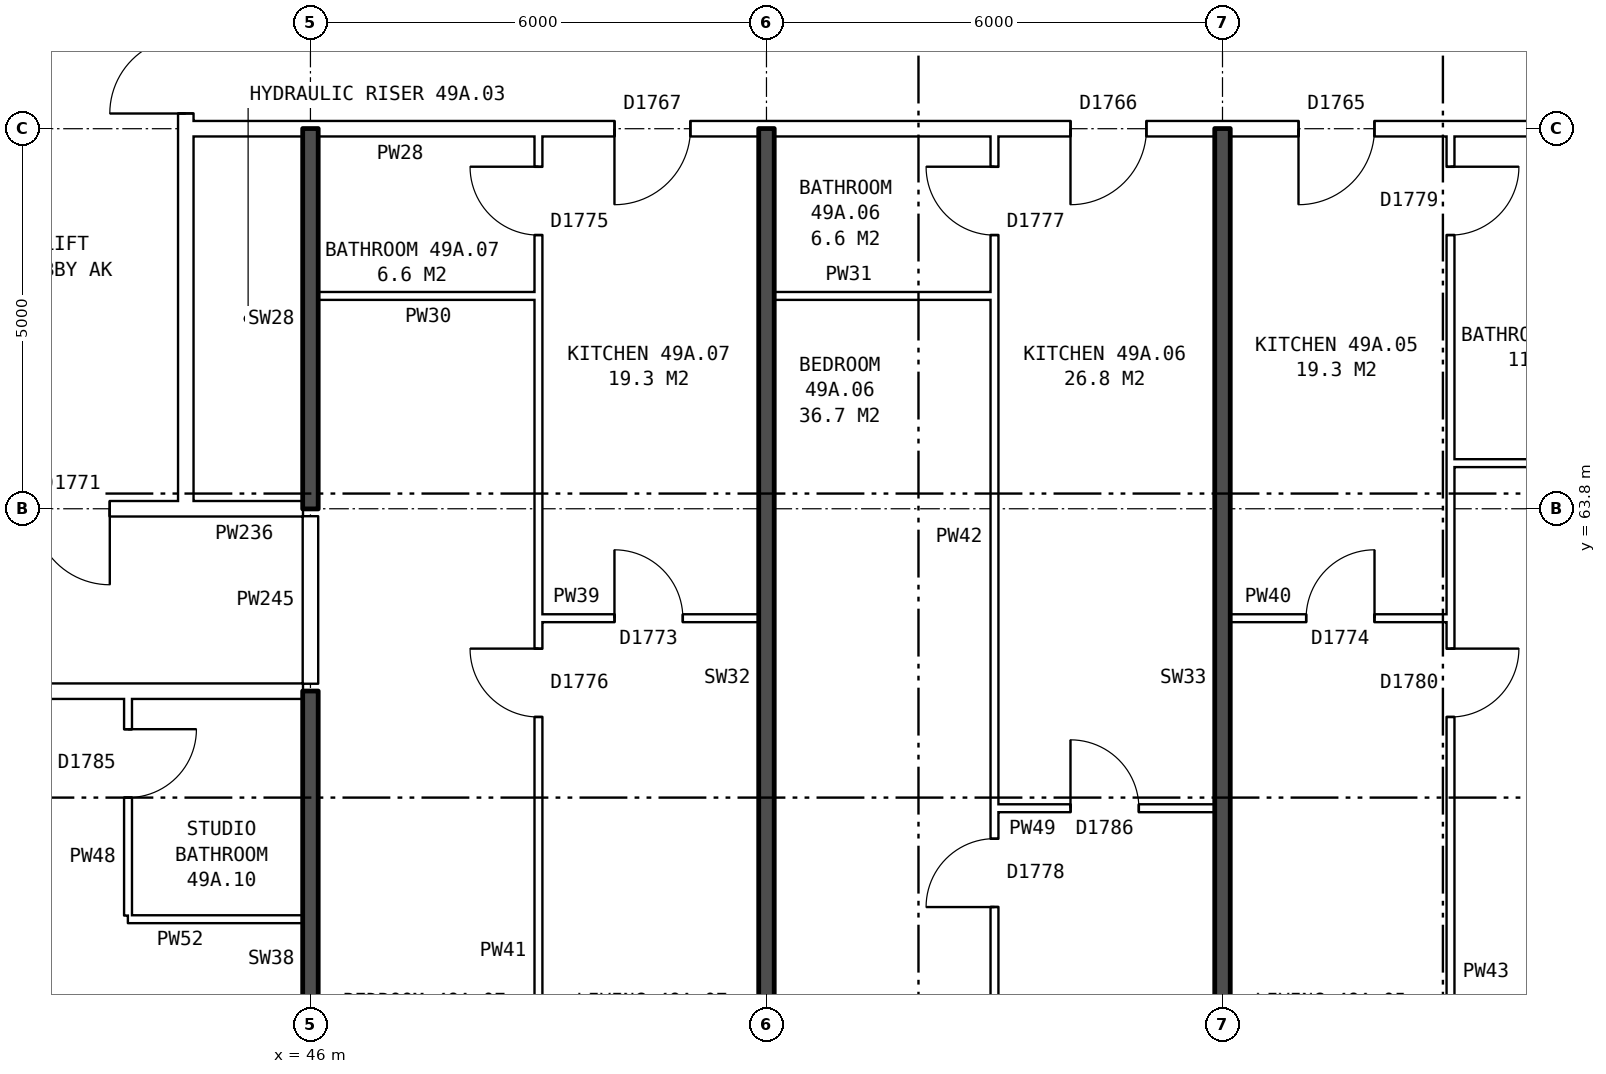
"""IFC4 building model, lengths in metres.
Left out: names, types, materials, properties, quantities, classifications, styles, units other than length and angle.
Written with IfcOpenShell. Run it as: python <this file> out.ifc"""

import sys

from ifc_helpers import new_model, si_unit, direction, frame, frame_2d, origin, place, context, subcontext, project, spatial, rectangle, extrude, element, fill, save


model = new_model("IFC4")
c1 = context("Model", 3, precision=1e-05, world=origin(), true_north=direction((0.0, 1.0)))
c2 = subcontext(c1, "Body", "Model", "MODEL_VIEW")
j1 = project(units=[si_unit("LENGTHUNIT", "METRE"), si_unit("PLANEANGLEUNIT", "RADIAN")], contexts=[c1])
p1 = place(None, origin())
s1 = spatial("IfcSite", under=j1, at=p1, CompositionType="ELEMENT")
p2 = place(p1, origin())
s2 = spatial("IfcBuilding", under=s1, at=p2, CompositionType="ELEMENT")
p3 = place(p2, frame((0.0, 0.0, 175.8)))
s3 = spatial("IfcBuildingStorey", under=s2, at=p3, CompositionType="ELEMENT", Elevation=175.8)
p4 = place(p3, frame((44.36, 63.9, 0.0), z_axis=(0.0, 0.0, 1.0), x_axis=(0.0, 1.0, 0.0)))
e1 = element("IfcWall", 1, at=p4, inside=s3, PredefinedType="PARTITIONING", context=c2, shape_type="SweptSolid", body=[
    extrude(rectangle(XDim=12.2, YDim=0.2, at=frame_2d((6.1, 0.0))), origin(), (0.0, 0.0, 1.0), 2.85),
])
p5 = place(p4, frame((5.1, 0.0, 0.0)))
e2 = element("IfcOpeningElement", 2, at=p5, cuts=e1, PredefinedType="OPENING", context=c2, shape_type="SweptSolid", body=[
    extrude(rectangle(XDim=2.0, YDim=2.1, at=frame_2d((1.0, 1.05))), frame((0.0, 0.11, 0.0), z_axis=(0.0, -1.0, 0.0), x_axis=(1.0, 0.0, 0.0)), (0.0, 0.0, 1.0), 0.22),
])
p6 = place(p3, frame((43.6, 58.4, 0.0), z_axis=(0.0, 0.0, 1.0), x_axis=(1.0, 0.0, 0.0)))
e3 = element("IfcWall", 3, at=p6, inside=s3, PredefinedType="PARTITIONING", context=c2, shape_type="SweptSolid", body=[
    extrude(rectangle(XDim=2.3, YDim=0.1, at=frame_2d((1.15, 0.0))), origin(), (0.0, 0.0, 1.0), 2.85),
])
p7 = place(p3, frame((55.0, 59.86, 0.0), z_axis=(0.0, 0.0, 1.0), x_axis=(1.0, 0.0, 0.0)))
e4 = element("IfcWall", 4, at=p7, inside=s3, PredefinedType="PARTITIONING", context=c2, shape_type="SweptSolid", body=[
    extrude(rectangle(XDim=2.9, YDim=0.1, at=frame_2d((1.45, 0.0))), origin(), (0.0, 0.0, 1.0), 2.85),
])
p8 = place(p7, frame((1.0, 0.0, 0.0)))
e5 = element("IfcOpeningElement", 5, at=p8, cuts=e4, PredefinedType="OPENING", context=c2, shape_type="SweptSolid", body=[
    extrude(rectangle(XDim=0.9, YDim=2.1, at=frame_2d((0.45, 1.05))), frame((0.0, 0.06, 0.0), z_axis=(0.0, -1.0, 0.0), x_axis=(1.0, 0.0, 0.0)), (0.0, 0.0, 1.0), 0.12),
])
p9 = place(p3, frame((30.61, 61.4, 0.0), z_axis=(0.0, 0.0, 1.0), x_axis=(1.0, 0.0, 0.0)))
e6 = element("IfcWall", 6, at=p9, inside=s3, PredefinedType="PARTITIONING", context=c2, shape_type="SweptSolid", body=[
    extrude(rectangle(XDim=15.29, YDim=0.2, at=frame_2d((7.645, 0.0))), origin(), (0.0, 0.0, 1.0), 2.85),
])
p10 = place(p9, frame((10.69, 0.0, 0.0)))
e7 = element("IfcOpeningElement", 7, at=p10, cuts=e6, PredefinedType="OPENING", context=c2, shape_type="SweptSolid", body=[
    extrude(rectangle(XDim=1.0, YDim=2.1, at=frame_2d((0.5, 1.05))), frame((0.0, 0.11, 0.0), z_axis=(0.0, -1.0, 0.0), x_axis=(1.0, 0.0, 0.0)), (0.0, 0.0, 1.0), 0.22),
])
p11 = place(p9, frame((5.89, 0.0, 0.0)))
e8 = element("IfcOpeningElement", 8, at=p11, cuts=e6, PredefinedType="OPENING", context=c2, shape_type="SweptSolid", body=[
    extrude(rectangle(XDim=1.0, YDim=2.1, at=frame_2d((0.5, 1.05))), frame((0.0, 0.11, 0.0), z_axis=(0.0, -1.0, 0.0), x_axis=(1.0, 0.0, 0.0)), (0.0, 0.0, 1.0), 0.22),
])
p12 = place(p3, frame((49.0, 62.36, 0.0), z_axis=(0.0, 0.0, 1.0), x_axis=(1.0, 0.0, 0.0)))
e9 = element("IfcWall", 9, at=p12, inside=s3, PredefinedType="PARTITIONING", context=c2, shape_type="SweptSolid", body=[
    extrude(rectangle(XDim=2.9, YDim=0.1, at=frame_2d((1.45, 0.0))), origin(), (0.0, 0.0, 1.0), 2.85),
])
p13 = place(p12, frame((1.0, 0.0, 0.0)))
e10 = element("IfcOpeningElement", 10, at=p13, cuts=e9, PredefinedType="OPENING", context=c2, shape_type="SweptSolid", body=[
    extrude(rectangle(XDim=0.9, YDim=2.1, at=frame_2d((0.45, 1.05))), frame((0.0, 0.06, 0.0), z_axis=(0.0, -1.0, 0.0), x_axis=(1.0, 0.0, 0.0)), (0.0, 0.0, 1.0), 0.12),
])
p14 = place(p3, frame((58.1, 62.36, 0.0), z_axis=(0.0, 0.0, 1.0), x_axis=(1.0, 0.0, 0.0)))
e11 = element("IfcWall", 11, at=p14, inside=s3, PredefinedType="PARTITIONING", context=c2, shape_type="SweptSolid", body=[
    extrude(rectangle(XDim=2.9, YDim=0.1, at=frame_2d((1.45, 0.0))), origin(), (0.0, 0.0, 1.0), 2.85),
])
p15 = place(p14, frame((1.0, 0.0, 0.0)))
e12 = element("IfcOpeningElement", 12, at=p15, cuts=e11, PredefinedType="OPENING", context=c2, shape_type="SweptSolid", body=[
    extrude(rectangle(XDim=0.9, YDim=2.1, at=frame_2d((0.45, 1.05))), frame((0.0, 0.06, 0.0), z_axis=(0.0, -1.0, 0.0), x_axis=(1.0, 0.0, 0.0)), (0.0, 0.0, 1.0), 0.12),
])
p16 = place(p3, frame((41.36, 63.8, 0.0), z_axis=(0.0, 0.0, 1.0), x_axis=(1.0, 0.0, 0.0)))
e13 = element("IfcWall", 13, at=p16, inside=s3, PredefinedType="PARTITIONING", context=c2, shape_type="SweptSolid", body=[
    extrude(rectangle(XDim=3.0, YDim=0.2, at=frame_2d((1.5, 0.0))), origin(), (0.0, 0.0, 1.0), 2.85),
])
p17 = place(p16, frame((1.0, 0.0, 0.0)))
e14 = element("IfcOpeningElement", 14, at=p17, cuts=e13, PredefinedType="OPENING", context=c2, shape_type="SweptSolid", body=[
    extrude(rectangle(XDim=1.0, YDim=2.1, at=frame_2d((0.5, 1.05))), frame((0.0, 0.11, 0.0), z_axis=(0.0, -1.0, 0.0), x_axis=(1.0, 0.0, 0.0)), (0.0, 0.0, 1.0), 0.22),
])
p18 = place(p3, frame((44.36, 63.8, 0.0), z_axis=(0.0, 0.0, 1.0), x_axis=(1.0, 0.0, 0.0)))
e15 = element("IfcWall", 15, at=p18, inside=s3, PredefinedType="PARTITIONING", context=c2, shape_type="SweptSolid", body=[
    extrude(rectangle(XDim=1.54, YDim=0.2, at=frame_2d((0.77, 0.0))), origin(), (0.0, 0.0, 1.0), 2.85),
])
p19 = place(p3, frame((61.0, 64.4, 0.0), z_axis=(0.0, 0.0, 1.0), x_axis=(1.0, 0.0, 0.0)))
e16 = element("IfcWall", 16, at=p19, inside=s3, PredefinedType="PARTITIONING", context=c2, shape_type="SweptSolid", body=[
    extrude(rectangle(XDim=2.64, YDim=0.1, at=frame_2d((1.32, 0.0))), origin(), (0.0, 0.0, 1.0), 2.85),
])
for number, where, z_axis, x_axis in (
    (17, (46.1, 66.6, 0.0), (0.0, 0.0, 1.0), (1.0, 0.0, 0.0)),
    (18, (52.1, 66.6, 0.0), (0.0, 0.0, 1.0), (1.0, 0.0, 0.0)),
):
    element("IfcWall", number, at=place(p3, frame(where, z_axis=z_axis, x_axis=x_axis)), inside=s3, PredefinedType="PARTITIONING", context=c2, shape_type="SweptSolid", body=[
        extrude(rectangle(XDim=2.9, YDim=0.1, at=frame_2d((1.45, 0.0))), origin(), (0.0, 0.0, 1.0), 2.85),
    ])
p20 = place(p3, frame((44.36, 68.8, 0.0), z_axis=(0.0, 0.0, 1.0), x_axis=(1.0, 0.0, 0.0)))
e19 = element("IfcWall", 19, at=p20, inside=s3, PredefinedType="PARTITIONING", context=c2, shape_type="SweptSolid", body=[
    extrude(rectangle(XDim=19.28, YDim=0.2, at=frame_2d((9.64, 0.0))), origin(), (0.0, 0.0, 1.0), 2.85),
])
p21 = place(p20, frame((14.64, 0.0, 0.0)))
e20 = element("IfcOpeningElement", 20, at=p21, cuts=e19, PredefinedType="OPENING", context=c2, shape_type="SweptSolid", body=[
    extrude(rectangle(XDim=1.0, YDim=2.1, at=frame_2d((0.5, 1.05))), frame((0.0, 0.11, 0.0), z_axis=(0.0, -1.0, 0.0), x_axis=(1.0, 0.0, 0.0)), (0.0, 0.0, 1.0), 0.22),
])
p22 = place(p20, frame((11.64, 0.0, 0.0)))
e21 = element("IfcOpeningElement", 21, at=p22, cuts=e19, PredefinedType="OPENING", context=c2, shape_type="SweptSolid", body=[
    extrude(rectangle(XDim=1.0, YDim=2.1, at=frame_2d((0.5, 1.05))), frame((0.0, 0.11, 0.0), z_axis=(0.0, -1.0, 0.0), x_axis=(1.0, 0.0, 0.0)), (0.0, 0.0, 1.0), 0.22),
])
p23 = place(p20, frame((5.64, 0.0, 0.0)))
e22 = element("IfcOpeningElement", 22, at=p23, cuts=e19, PredefinedType="OPENING", context=c2, shape_type="SweptSolid", body=[
    extrude(rectangle(XDim=1.0, YDim=2.1, at=frame_2d((0.5, 1.05))), frame((0.0, 0.11, 0.0), z_axis=(0.0, -1.0, 0.0), x_axis=(1.0, 0.0, 0.0)), (0.0, 0.0, 1.0), 0.22),
])
p24 = place(p3, frame((43.6, 58.45, 0.0), z_axis=(0.0, 0.0, 1.0), x_axis=(0.0, 1.0, 0.0)))
e23 = element("IfcWall", 23, at=p24, inside=s3, PredefinedType="PARTITIONING", context=c2, shape_type="SweptSolid", body=[
    extrude(rectangle(XDim=2.85, YDim=0.1, at=frame_2d((1.425, 0.0))), origin(), (0.0, 0.0, 1.0), 2.85),
])
p25 = place(p24, frame((1.55, 0.0, 0.0)))
e24 = element("IfcOpeningElement", 24, at=p25, cuts=e23, PredefinedType="OPENING", context=c2, shape_type="SweptSolid", body=[
    extrude(rectangle(XDim=0.9, YDim=2.1, at=frame_2d((0.45, 1.05))), frame((0.0, 0.06, 0.0), z_axis=(0.0, -1.0, 0.0), x_axis=(1.0, 0.0, 0.0)), (0.0, 0.0, 1.0), 0.12),
])
p26 = place(p3, frame((46.0, 54.36, 0.0), z_axis=(0.0, 0.0, 1.0), x_axis=(0.0, 1.0, 0.0)))
e25 = element("IfcWall", 25, at=p26, inside=s3, PredefinedType="SOLIDWALL", context=c2, shape_type="SweptSolid", body=[
    extrude(rectangle(XDim=7.04, YDim=0.2, at=frame_2d((3.52, 0.0))), origin(), (0.0, 0.0, 1.0), 2.85),
])
p27 = place(p3, frame((46.0, 61.5, 0.0), z_axis=(0.0, 0.0, 1.0), x_axis=(0.0, 1.0, 0.0)))
e26 = element("IfcWall", 26, at=p27, inside=s3, PredefinedType="PARTITIONING", context=c2, shape_type="SweptSolid", body=[
    extrude(rectangle(XDim=2.2, YDim=0.2, at=frame_2d((1.1, 0.0))), origin(), (0.0, 0.0, 1.0), 2.85),
])
p28 = place(p3, frame((46.0, 63.8, 0.0), z_axis=(0.0, 0.0, 1.0), x_axis=(0.0, 1.0, 0.0)))
e27 = element("IfcWall", 27, at=p28, inside=s3, PredefinedType="SOLIDWALL", context=c2, shape_type="SweptSolid", body=[
    extrude(rectangle(XDim=5.0, YDim=0.2, at=frame_2d((2.5, 0.0))), origin(), (0.0, 0.0, 1.0), 2.85),
])
p29 = place(p3, frame((49.0, 54.36, 0.0), z_axis=(0.0, 0.0, 1.0), x_axis=(0.0, 1.0, 0.0)))
e28 = element("IfcWall", 28, at=p29, inside=s3, PredefinedType="PARTITIONING", context=c2, shape_type="SweptSolid", body=[
    extrude(rectangle(XDim=14.34, YDim=0.1, at=frame_2d((7.17, 0.0))), origin(), (0.0, 0.0, 1.0), 2.85),
])
p30 = place(p29, frame((6.7, 0.0, 0.0)))
e29 = element("IfcOpeningElement", 29, at=p30, cuts=e28, PredefinedType="OPENING", context=c2, shape_type="SweptSolid", body=[
    extrude(rectangle(XDim=0.9, YDim=2.1, at=frame_2d((0.45, 1.05))), frame((0.0, 0.06, 0.0), z_axis=(0.0, -1.0, 0.0), x_axis=(1.0, 0.0, 0.0)), (0.0, 0.0, 1.0), 0.12),
])
p31 = place(p29, frame((13.04, 0.0, 0.0)))
e30 = element("IfcOpeningElement", 30, at=p31, cuts=e28, PredefinedType="OPENING", context=c2, shape_type="SweptSolid", body=[
    extrude(rectangle(XDim=0.9, YDim=2.1, at=frame_2d((0.45, 1.05))), frame((0.0, 0.06, 0.0), z_axis=(0.0, -1.0, 0.0), x_axis=(1.0, 0.0, 0.0)), (0.0, 0.0, 1.0), 0.12),
])
p32 = place(p3, frame((52.0, 54.36, 0.0), z_axis=(0.0, 0.0, 1.0), x_axis=(0.0, 1.0, 0.0)))
e31 = element("IfcWall", 31, at=p32, inside=s3, PredefinedType="SOLIDWALL", context=c2, shape_type="SweptSolid", body=[
    extrude(rectangle(XDim=14.44, YDim=0.2, at=frame_2d((7.22, 0.0))), origin(), (0.0, 0.0, 1.0), 2.85),
])
p33 = place(p3, frame((55.0, 54.36, 0.0), z_axis=(0.0, 0.0, 1.0), x_axis=(0.0, 1.0, 0.0)))
e32 = element("IfcWall", 32, at=p33, inside=s3, PredefinedType="PARTITIONING", context=c2, shape_type="SweptSolid", body=[
    extrude(rectangle(XDim=14.34, YDim=0.1, at=frame_2d((7.17, 0.0))), origin(), (0.0, 0.0, 1.0), 2.85),
])
p34 = place(p33, frame((4.2, 0.0, 0.0)))
e33 = element("IfcOpeningElement", 33, at=p34, cuts=e32, PredefinedType="OPENING", context=c2, shape_type="SweptSolid", body=[
    extrude(rectangle(XDim=0.9, YDim=2.1, at=frame_2d((0.45, 1.05))), frame((0.0, 0.06, 0.0), z_axis=(0.0, -1.0, 0.0), x_axis=(1.0, 0.0, 0.0)), (0.0, 0.0, 1.0), 0.12),
])
p35 = place(p33, frame((13.04, 0.0, 0.0)))
e34 = element("IfcOpeningElement", 34, at=p35, cuts=e32, PredefinedType="OPENING", context=c2, shape_type="SweptSolid", body=[
    extrude(rectangle(XDim=0.9, YDim=2.1, at=frame_2d((0.45, 1.05))), frame((0.0, 0.06, 0.0), z_axis=(0.0, -1.0, 0.0), x_axis=(1.0, 0.0, 0.0)), (0.0, 0.0, 1.0), 0.12),
])
p36 = place(p3, frame((58.0, 54.36, 0.0), z_axis=(0.0, 0.0, 1.0), x_axis=(0.0, 1.0, 0.0)))
e35 = element("IfcWall", 35, at=p36, inside=s3, PredefinedType="SOLIDWALL", context=c2, shape_type="SweptSolid", body=[
    extrude(rectangle(XDim=14.44, YDim=0.2, at=frame_2d((7.22, 0.0))), origin(), (0.0, 0.0, 1.0), 2.85),
])
p37 = place(p3, frame((61.0, 54.36, 0.0), z_axis=(0.0, 0.0, 1.0), x_axis=(0.0, 1.0, 0.0)))
e36 = element("IfcWall", 36, at=p37, inside=s3, PredefinedType="PARTITIONING", context=c2, shape_type="SweptSolid", body=[
    extrude(rectangle(XDim=14.34, YDim=0.1, at=frame_2d((7.17, 0.0))), origin(), (0.0, 0.0, 1.0), 2.85),
])
p38 = place(p37, frame((6.7, 0.0, 0.0)))
e37 = element("IfcOpeningElement", 37, at=p38, cuts=e36, PredefinedType="OPENING", context=c2, shape_type="SweptSolid", body=[
    extrude(rectangle(XDim=0.9, YDim=2.1, at=frame_2d((0.45, 1.05))), frame((0.0, 0.06, 0.0), z_axis=(0.0, -1.0, 0.0), x_axis=(1.0, 0.0, 0.0)), (0.0, 0.0, 1.0), 0.12),
])
p39 = place(p37, frame((13.04, 0.0, 0.0)))
e38 = element("IfcOpeningElement", 38, at=p39, cuts=e36, PredefinedType="OPENING", context=c2, shape_type="SweptSolid", body=[
    extrude(rectangle(XDim=0.9, YDim=2.1, at=frame_2d((0.45, 1.05))), frame((0.0, 0.06, 0.0), z_axis=(0.0, -1.0, 0.0), x_axis=(1.0, 0.0, 0.0)), (0.0, 0.0, 1.0), 0.12),
])
p40 = place(p5, origin())
e39 = element("IfcDoor", 39, at=p40, inside=s3, OperationType="DOUBLE_DOOR_SINGLE_SWING", PredefinedType="DOOR", context=c2, shape_type="SweptSolid", body=[
    extrude(rectangle(XDim=2.0, YDim=2.1, at=frame_2d((1.0, 1.05))), frame((0.0, 0.025, 0.0), z_axis=(0.0, -1.0, 0.0), x_axis=(1.0, 0.0, 0.0)), (0.0, 0.0, 1.0), 0.05),
])
fill(e2, e39)
p41 = place(p17, frame((1.0, 0.0, 0.0), z_axis=(0.0, 0.0, 1.0), x_axis=(-1.0, 0.0, 0.0)))
e40 = element("IfcDoor", 40, at=p41, inside=s3, OperationType="SINGLE_SWING_LEFT", PredefinedType="DOOR", context=c2, shape_type="SweptSolid", body=[
    extrude(rectangle(XDim=1.0, YDim=2.1, at=frame_2d((0.5, 1.05))), frame((0.0, 0.025, 0.0), z_axis=(0.0, -1.0, 0.0), x_axis=(1.0, 0.0, 0.0)), (0.0, 0.0, 1.0), 0.05),
])
fill(e14, e40)
p42 = place(p38, frame((0.9, 0.0, 0.0), z_axis=(0.0, 0.0, 1.0), x_axis=(-1.0, 0.0, 0.0)))
e41 = element("IfcDoor", 41, at=p42, inside=s3, OperationType="SINGLE_SWING_LEFT", PredefinedType="DOOR", context=c2, shape_type="SweptSolid", body=[
    extrude(rectangle(XDim=0.9, YDim=2.1, at=frame_2d((0.45, 1.05))), frame((0.0, 0.025, 0.0), z_axis=(0.0, -1.0, 0.0), x_axis=(1.0, 0.0, 0.0)), (0.0, 0.0, 1.0), 0.05),
])
fill(e37, e41)
p43 = place(p21, frame((1.0, 0.0, 0.0), z_axis=(0.0, 0.0, 1.0), x_axis=(-1.0, 0.0, 0.0)))
e42 = element("IfcDoor", 42, at=p43, inside=s3, OperationType="SINGLE_SWING_RIGHT", PredefinedType="DOOR", context=c2, shape_type="SweptSolid", body=[
    extrude(rectangle(XDim=1.0, YDim=2.1, at=frame_2d((0.5, 1.05))), frame((0.0, 0.025, 0.0), z_axis=(0.0, -1.0, 0.0), x_axis=(1.0, 0.0, 0.0)), (0.0, 0.0, 1.0), 0.05),
])
fill(e20, e42)
p44 = place(p15, origin())
e43 = element("IfcDoor", 43, at=p44, inside=s3, OperationType="SINGLE_SWING_RIGHT", PredefinedType="DOOR", context=c2, shape_type="SweptSolid", body=[
    extrude(rectangle(XDim=0.9, YDim=2.1, at=frame_2d((0.45, 1.05))), frame((0.0, 0.025, 0.0), z_axis=(0.0, -1.0, 0.0), x_axis=(1.0, 0.0, 0.0)), (0.0, 0.0, 1.0), 0.05),
])
fill(e12, e43)
p45 = place(p39, frame((0.9, 0.0, 0.0), z_axis=(0.0, 0.0, 1.0), x_axis=(-1.0, 0.0, 0.0)))
e44 = element("IfcDoor", 44, at=p45, inside=s3, OperationType="SINGLE_SWING_LEFT", PredefinedType="DOOR", context=c2, shape_type="SweptSolid", body=[
    extrude(rectangle(XDim=0.9, YDim=2.1, at=frame_2d((0.45, 1.05))), frame((0.0, 0.025, 0.0), z_axis=(0.0, -1.0, 0.0), x_axis=(1.0, 0.0, 0.0)), (0.0, 0.0, 1.0), 0.05),
])
fill(e38, e44)
p46 = place(p34, origin())
e45 = element("IfcDoor", 45, at=p46, inside=s3, OperationType="SINGLE_SWING_LEFT", PredefinedType="DOOR", context=c2, shape_type="SweptSolid", body=[
    extrude(rectangle(XDim=0.9, YDim=2.1, at=frame_2d((0.45, 1.05))), frame((0.0, 0.025, 0.0), z_axis=(0.0, -1.0, 0.0), x_axis=(1.0, 0.0, 0.0)), (0.0, 0.0, 1.0), 0.05),
])
fill(e33, e45)
p47 = place(p22, frame((1.0, 0.0, 0.0), z_axis=(0.0, 0.0, 1.0), x_axis=(-1.0, 0.0, 0.0)))
e46 = element("IfcDoor", 46, at=p47, inside=s3, OperationType="SINGLE_SWING_RIGHT", PredefinedType="DOOR", context=c2, shape_type="SweptSolid", body=[
    extrude(rectangle(XDim=1.0, YDim=2.1, at=frame_2d((0.5, 1.05))), frame((0.0, 0.025, 0.0), z_axis=(0.0, -1.0, 0.0), x_axis=(1.0, 0.0, 0.0)), (0.0, 0.0, 1.0), 0.05),
])
fill(e21, e46)
p48 = place(p8, origin())
e47 = element("IfcDoor", 47, at=p48, inside=s3, OperationType="SINGLE_SWING_LEFT", PredefinedType="DOOR", context=c2, shape_type="SweptSolid", body=[
    extrude(rectangle(XDim=0.9, YDim=2.1, at=frame_2d((0.45, 1.05))), frame((0.0, 0.025, 0.0), z_axis=(0.0, -1.0, 0.0), x_axis=(1.0, 0.0, 0.0)), (0.0, 0.0, 1.0), 0.05),
])
fill(e5, e47)
p49 = place(p35, origin())
e48 = element("IfcDoor", 48, at=p49, inside=s3, OperationType="SINGLE_SWING_RIGHT", PredefinedType="DOOR", context=c2, shape_type="SweptSolid", body=[
    extrude(rectangle(XDim=0.9, YDim=2.1, at=frame_2d((0.45, 1.05))), frame((0.0, 0.025, 0.0), z_axis=(0.0, -1.0, 0.0), x_axis=(1.0, 0.0, 0.0)), (0.0, 0.0, 1.0), 0.05),
])
fill(e34, e48)
p50 = place(p30, origin())
e49 = element("IfcDoor", 49, at=p50, inside=s3, OperationType="SINGLE_SWING_RIGHT", PredefinedType="DOOR", context=c2, shape_type="SweptSolid", body=[
    extrude(rectangle(XDim=0.9, YDim=2.1, at=frame_2d((0.45, 1.05))), frame((0.0, 0.025, 0.0), z_axis=(0.0, -1.0, 0.0), x_axis=(1.0, 0.0, 0.0)), (0.0, 0.0, 1.0), 0.05),
])
fill(e29, e49)
p51 = place(p23, frame((1.0, 0.0, 0.0), z_axis=(0.0, 0.0, 1.0), x_axis=(-1.0, 0.0, 0.0)))
e50 = element("IfcDoor", 50, at=p51, inside=s3, OperationType="SINGLE_SWING_RIGHT", PredefinedType="DOOR", context=c2, shape_type="SweptSolid", body=[
    extrude(rectangle(XDim=1.0, YDim=2.1, at=frame_2d((0.5, 1.05))), frame((0.0, 0.025, 0.0), z_axis=(0.0, -1.0, 0.0), x_axis=(1.0, 0.0, 0.0)), (0.0, 0.0, 1.0), 0.05),
])
fill(e22, e50)
p52 = place(p13, origin())
e51 = element("IfcDoor", 51, at=p52, inside=s3, OperationType="SINGLE_SWING_LEFT", PredefinedType="DOOR", context=c2, shape_type="SweptSolid", body=[
    extrude(rectangle(XDim=0.9, YDim=2.1, at=frame_2d((0.45, 1.05))), frame((0.0, 0.025, 0.0), z_axis=(0.0, -1.0, 0.0), x_axis=(1.0, 0.0, 0.0)), (0.0, 0.0, 1.0), 0.05),
])
fill(e10, e51)
p53 = place(p31, origin())
e52 = element("IfcDoor", 52, at=p53, inside=s3, OperationType="SINGLE_SWING_RIGHT", PredefinedType="DOOR", context=c2, shape_type="SweptSolid", body=[
    extrude(rectangle(XDim=0.9, YDim=2.1, at=frame_2d((0.45, 1.05))), frame((0.0, 0.025, 0.0), z_axis=(0.0, -1.0, 0.0), x_axis=(1.0, 0.0, 0.0)), (0.0, 0.0, 1.0), 0.05),
])
fill(e30, e52)
p54 = place(p25, frame((0.9, 0.0, 0.0), z_axis=(0.0, 0.0, 1.0), x_axis=(-1.0, 0.0, 0.0)))
e53 = element("IfcDoor", 53, at=p54, inside=s3, OperationType="SINGLE_SWING_LEFT", PredefinedType="DOOR", context=c2, shape_type="SweptSolid", body=[
    extrude(rectangle(XDim=0.9, YDim=2.1, at=frame_2d((0.45, 1.05))), frame((0.0, 0.025, 0.0), z_axis=(0.0, -1.0, 0.0), x_axis=(1.0, 0.0, 0.0)), (0.0, 0.0, 1.0), 0.05),
])
fill(e24, e53)
save(model, sys.argv[1])
